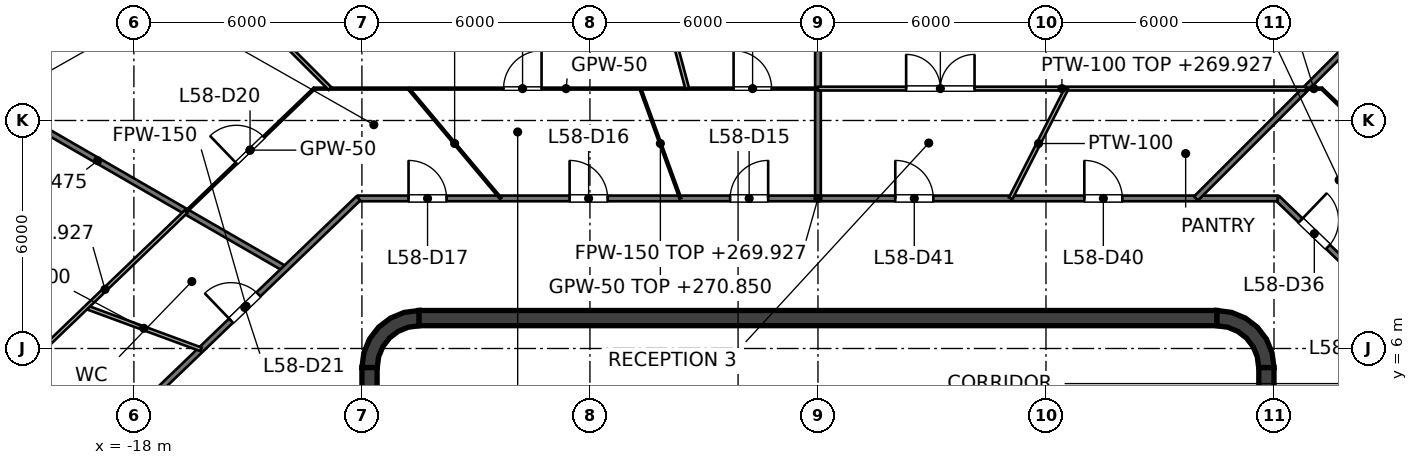
"""IFC4 building model, lengths in metres.
Left out: names, types, materials, properties, quantities, classifications, styles, units other than length and angle.
Written with IfcOpenShell. Run it as: python <this file> out.ifc"""

import sys

from ifc_helpers import new_model, si_unit, direction, frame, frame_2d, origin, place, context, subcontext, project, spatial, polyline, rectangle, outline, extrude, element, fill, save


model = new_model("IFC4")
c1 = context("Model", 3, precision=1e-05, world=origin(), true_north=direction((0.0, 1.0)))
c2 = subcontext(c1, "Body", "Model", "MODEL_VIEW")
j1 = project(units=[si_unit("LENGTHUNIT", "METRE"), si_unit("PLANEANGLEUNIT", "RADIAN")], contexts=[c1])
p1 = place(None, origin())
s1 = spatial("IfcSite", under=j1, at=p1, CompositionType="ELEMENT")
p2 = place(p1, origin())
s2 = spatial("IfcBuilding", under=s1, at=p2, CompositionType="ELEMENT")
p3 = place(p2, frame((0.0, 0.0, 267.0)))
s3 = spatial("IfcBuildingStorey", under=s2, at=p3, CompositionType="ELEMENT", Elevation=267.0)
p4 = place(p3, frame((-10.5, 6.8, 0.0), z_axis=(0.0, 0.0, 1.0), x_axis=(1.0, 0.0, 0.0)))
e1 = element("IfcWall", 1, at=p4, inside=s3, PredefinedType="SHEAR", context=c2, shape_type="SweptSolid", body=[
    extrude(rectangle(XDim=21.0, YDim=0.4, at=frame_2d((10.5, 0.0))), origin(), (0.0, 0.0, 1.0), 4.0),
])
p5 = place(p3, frame((11.8, -5.5, 0.0), z_axis=(0.0, 0.0, 1.0), x_axis=(0.0, 1.0, 0.0)))
e2 = element("IfcWall", 2, at=p5, inside=s3, PredefinedType="SHEAR", context=c2, shape_type="SweptSolid", body=[
    extrude(rectangle(XDim=11.0, YDim=0.4, at=frame_2d((5.5, 0.0))), origin(), (0.0, 0.0, 1.0), 4.0),
])
p6 = place(p5, frame((5.0, 0.0, 0.0)))
e3 = element("IfcOpeningElement", 3, at=p6, cuts=e2, PredefinedType="OPENING", context=c2, shape_type="SweptSolid", body=[
    extrude(rectangle(XDim=1.0, YDim=2.1, at=frame_2d((0.5, 1.05))), frame((0.0, 0.2, 0.0), z_axis=(0.0, -1.0, 0.0), x_axis=(1.0, 0.0, 0.0)), (0.0, 0.0, 1.0), 0.4),
])
p7 = place(p5, frame((0.9, 0.0, 0.0)))
e4 = element("IfcOpeningElement", 4, at=p7, cuts=e2, PredefinedType="OPENING", context=c2, shape_type="SweptSolid", body=[
    extrude(rectangle(XDim=1.2, YDim=2.1, at=frame_2d((0.6, 1.05))), frame((0.0, 0.2, 0.0), z_axis=(0.0, -1.0, 0.0), x_axis=(1.0, 0.0, 0.0)), (0.0, 0.0, 1.0), 0.4),
])
p8 = place(p5, frame((8.9, 0.0, 0.0)))
e5 = element("IfcOpeningElement", 5, at=p8, cuts=e2, PredefinedType="OPENING", context=c2, shape_type="SweptSolid", body=[
    extrude(rectangle(XDim=1.2, YDim=2.1, at=frame_2d((0.6, 1.05))), frame((0.0, 0.2, 0.0), z_axis=(0.0, -1.0, 0.0), x_axis=(1.0, 0.0, 0.0)), (0.0, 0.0, 1.0), 0.4),
])
p9 = place(p3, frame((-11.8, -5.5, 0.0), z_axis=(0.0, 0.0, 1.0), x_axis=(0.0, 1.0, 0.0)))
e6 = element("IfcWall", 6, at=p9, inside=s3, PredefinedType="SHEAR", context=c2, shape_type="SweptSolid", body=[
    extrude(rectangle(XDim=11.0, YDim=0.4, at=frame_2d((5.5, 0.0))), origin(), (0.0, 0.0, 1.0), 4.0),
])
p10 = place(p9, frame((5.0, 0.0, 0.0)))
e7 = element("IfcOpeningElement", 7, at=p10, cuts=e6, PredefinedType="OPENING", context=c2, shape_type="SweptSolid", body=[
    extrude(rectangle(XDim=1.0, YDim=2.1, at=frame_2d((0.5, 1.05))), frame((0.0, 0.2, 0.0), z_axis=(0.0, -1.0, 0.0), x_axis=(1.0, 0.0, 0.0)), (0.0, 0.0, 1.0), 0.4),
])
p11 = place(p9, frame((0.9, 0.0, 0.0)))
e8 = element("IfcOpeningElement", 8, at=p11, cuts=e6, PredefinedType="OPENING", context=c2, shape_type="SweptSolid", body=[
    extrude(rectangle(XDim=1.2, YDim=2.1, at=frame_2d((0.6, 1.05))), frame((0.0, 0.2, 0.0), z_axis=(0.0, -1.0, 0.0), x_axis=(1.0, 0.0, 0.0)), (0.0, 0.0, 1.0), 0.4),
])
p12 = place(p9, frame((8.9, 0.0, 0.0)))
e9 = element("IfcOpeningElement", 9, at=p12, cuts=e6, PredefinedType="OPENING", context=c2, shape_type="SweptSolid", body=[
    extrude(rectangle(XDim=1.2, YDim=2.1, at=frame_2d((0.6, 1.05))), frame((0.0, 0.2, 0.0), z_axis=(0.0, -1.0, 0.0), x_axis=(1.0, 0.0, 0.0)), (0.0, 0.0, 1.0), 0.4),
])
p13 = place(p3, origin())
e10 = element("IfcWall", 10, at=p13, inside=s3, PredefinedType="SHEAR", context=c2, shape_type="SweptSolid", body=[
    extrude(outline(polyline([(10.5, 7.0), (10.5, 6.596), (10.784, 6.559), (11.048, 6.45), (11.275, 6.275), (11.45, 6.048), (11.559, 5.784), (11.596, 5.5), (12.0, 5.5), (11.949, 5.888), (11.799, 6.25), (11.561, 6.561), (11.25, 6.799), (10.888, 6.949), (10.5, 7.0)])), origin(), (0.0, 0.0, 1.0), 4.0),
])
e11 = element("IfcWall", 11, at=p13, inside=s3, PredefinedType="SHEAR", context=c2, shape_type="SweptSolid", body=[
    extrude(outline(polyline([(-12.0, 5.5), (-11.596, 5.5), (-11.559, 5.784), (-11.45, 6.048), (-11.275, 6.275), (-11.048, 6.45), (-10.784, 6.559), (-10.5, 6.596), (-10.5, 7.0), (-10.888, 6.949), (-11.25, 6.799), (-11.561, 6.561), (-11.799, 6.25), (-11.949, 5.888), (-12.0, 5.5)])), origin(), (0.0, 0.0, 1.0), 4.0),
])
p14 = place(p3, frame((-9.0, 4.1, 0.0), z_axis=(0.0, 0.0, 1.0), x_axis=(0.0, 1.0, 0.0)))
e12 = element("IfcWall", 12, at=p14, inside=s3, PredefinedType="SOLIDWALL", context=c2, shape_type="SweptSolid", body=[
    extrude(rectangle(XDim=2.5, YDim=0.25, at=frame_2d((1.25, 0.0))), origin(), (0.0, 0.0, 1.0), 3.85),
])
p15 = place(p14, frame((0.65, 0.0, 0.0)))
e13 = element("IfcOpeningElement", 13, at=p15, cuts=e12, PredefinedType="OPENING", context=c2, shape_type="SweptSolid", body=[
    extrude(rectangle(XDim=1.2, YDim=2.1, at=frame_2d((0.6, 1.05))), frame((0.0, 0.125, 0.0), z_axis=(0.0, -1.0, 0.0), x_axis=(1.0, 0.0, 0.0)), (0.0, 0.0, 1.0), 0.25),
])
p16 = place(p3, frame((9.0, 4.1, 0.0), z_axis=(0.0, 0.0, 1.0), x_axis=(0.0, 1.0, 0.0)))
e14 = element("IfcWall", 14, at=p16, inside=s3, PredefinedType="SOLIDWALL", context=c2, shape_type="SweptSolid", body=[
    extrude(rectangle(XDim=2.5, YDim=0.25, at=frame_2d((1.25, 0.0))), origin(), (0.0, 0.0, 1.0), 3.85),
])
p17 = place(p16, frame((0.65, 0.0, 0.0)))
e15 = element("IfcOpeningElement", 15, at=p17, cuts=e14, PredefinedType="OPENING", context=c2, shape_type="SweptSolid", body=[
    extrude(rectangle(XDim=1.2, YDim=2.1, at=frame_2d((0.6, 1.05))), frame((0.0, 0.125, 0.0), z_axis=(0.0, -1.0, 0.0), x_axis=(1.0, 0.0, 0.0)), (0.0, 0.0, 1.0), 0.25),
])
for number, where, z_axis, x_axis in (
    (16, (-3.15, 4.1, 0.0), (0.0, 0.0, 1.0), (0.0, 1.0, 0.0)),
    (17, (3.15, 4.1, 0.0), (0.0, 0.0, 1.0), (0.0, 1.0, 0.0)),
):
    element("IfcWall", number, at=place(p3, frame(where, z_axis=z_axis, x_axis=x_axis)), inside=s3, PredefinedType="SOLIDWALL", context=c2, shape_type="SweptSolid", body=[
        extrude(rectangle(XDim=2.5, YDim=0.25, at=frame_2d((1.25, 0.0))), origin(), (0.0, 0.0, 1.0), 3.85),
    ])
p18 = place(p3, frame((12.095, 9.949, 0.0), z_axis=(0.0, 0.0, 1.0), x_axis=(0.721290181137, -0.692633001376, 0.0)))
e18 = element("IfcWall", 18, at=p18, inside=s3, PredefinedType="PARTITIONING", context=c2, shape_type="SweptSolid", body=[
    extrude(rectangle(XDim=8.187, YDim=0.15, at=frame_2d((4.094, 0.0))), origin(), (0.0, 0.0, 1.0), 2.918),
])
p19 = place(p18, frame((3.232, 0.0, 0.0)))
e19 = element("IfcOpeningElement", 19, at=p19, cuts=e18, PredefinedType="OPENING", context=c2, shape_type="SweptSolid", body=[
    extrude(rectangle(XDim=1.0, YDim=2.1, at=frame_2d((0.5, 1.05))), frame((0.0, 0.075, 0.0), z_axis=(0.0, -1.0, 0.0), x_axis=(1.0, 0.0, 0.0)), (0.0, 0.0, 1.0), 0.15),
])
p20 = place(p18, frame((0.839, 0.0, 0.0)))
e20 = element("IfcOpeningElement", 20, at=p20, cuts=e18, PredefinedType="OPENING", context=c2, shape_type="SweptSolid", body=[
    extrude(rectangle(XDim=1.0, YDim=2.1, at=frame_2d((0.5, 1.05))), frame((0.0, 0.075, 0.0), z_axis=(0.0, -1.0, 0.0), x_axis=(1.0, 0.0, 0.0)), (0.0, 0.0, 1.0), 0.15),
])
p21 = place(p3, frame((-23.883, 13.789, 0.0), z_axis=(0.0, 0.0, 1.0), x_axis=(0.866026665955, -0.499997813851, 0.0)))
e21 = element("IfcWall", 21, at=p21, inside=s3, PredefinedType="PARTITIONING", context=c2, shape_type="SweptSolid", body=[
    extrude(rectangle(XDim=11.384, YDim=0.15, at=frame_2d((5.692, 0.0))), origin(), (0.0, 0.0, 1.0), 3.475),
])
p22 = place(p3, frame((-12.095, 9.949, 0.0), z_axis=(0.0, 0.0, 1.0), x_axis=(1.0, 0.0, 0.0)))
e22 = element("IfcWall", 22, at=p22, inside=s3, PredefinedType="PARTITIONING", context=c2, shape_type="SweptSolid", body=[
    extrude(rectangle(XDim=24.19, YDim=0.15, at=frame_2d((12.095, 0.0))), origin(), (0.0, 0.0, 1.0), 2.927),
])
p23 = place(p22, frame((9.784, 0.0, 0.0)))
e23 = element("IfcOpeningElement", 23, at=p23, cuts=e22, PredefinedType="OPENING", context=c2, shape_type="SweptSolid", body=[
    extrude(rectangle(XDim=1.0, YDim=2.1, at=frame_2d((0.5, 1.05))), frame((0.0, 0.075, 0.0), z_axis=(0.0, -1.0, 0.0), x_axis=(1.0, 0.0, 0.0)), (0.0, 0.0, 1.0), 0.15),
])
p24 = place(p22, frame((5.56, 0.0, 0.0)))
e24 = element("IfcOpeningElement", 24, at=p24, cuts=e22, PredefinedType="OPENING", context=c2, shape_type="SweptSolid", body=[
    extrude(rectangle(XDim=1.0, YDim=2.1, at=frame_2d((0.5, 1.05))), frame((0.0, 0.075, 0.0), z_axis=(0.0, -1.0, 0.0), x_axis=(1.0, 0.0, 0.0)), (0.0, 0.0, 1.0), 0.15),
])
p25 = place(p22, frame((1.322, 0.0, 0.0)))
e25 = element("IfcOpeningElement", 25, at=p25, cuts=e22, PredefinedType="OPENING", context=c2, shape_type="SweptSolid", body=[
    extrude(rectangle(XDim=1.0, YDim=2.1, at=frame_2d((0.5, 1.05))), frame((0.0, 0.075, 0.0), z_axis=(0.0, -1.0, 0.0), x_axis=(1.0, 0.0, 0.0)), (0.0, 0.0, 1.0), 0.15),
])
p26 = place(p22, frame((19.104, 0.0, 0.0)))
e26 = element("IfcOpeningElement", 26, at=p26, cuts=e22, PredefinedType="OPENING", context=c2, shape_type="SweptSolid", body=[
    extrude(rectangle(XDim=1.0, YDim=2.1, at=frame_2d((0.5, 1.05))), frame((0.0, 0.075, 0.0), z_axis=(0.0, -1.0, 0.0), x_axis=(1.0, 0.0, 0.0)), (0.0, 0.0, 1.0), 0.15),
])
p27 = place(p22, frame((14.129, 0.0, 0.0)))
e27 = element("IfcOpeningElement", 27, at=p27, cuts=e22, PredefinedType="OPENING", context=c2, shape_type="SweptSolid", body=[
    extrude(rectangle(XDim=1.0, YDim=2.1, at=frame_2d((0.5, 1.05))), frame((0.0, 0.075, 0.0), z_axis=(0.0, -1.0, 0.0), x_axis=(1.0, 0.0, 0.0)), (0.0, 0.0, 1.0), 0.15),
])
p28 = place(p3, frame((-18.0, 4.278, 0.0), z_axis=(0.0, 0.0, 1.0), x_axis=(0.721260976692, 0.69266341285, 0.0)))
e28 = element("IfcWall", 28, at=p28, inside=s3, PredefinedType="PARTITIONING", context=c2, shape_type="SweptSolid", body=[
    extrude(rectangle(XDim=8.187, YDim=0.15, at=frame_2d((4.094, 0.0))), origin(), (0.0, 0.0, 1.0), 2.918),
])
p29 = place(p28, frame((3.544, 0.0, 0.0)))
e29 = element("IfcOpeningElement", 29, at=p29, cuts=e28, PredefinedType="OPENING", context=c2, shape_type="SweptSolid", body=[
    extrude(rectangle(XDim=1.0, YDim=2.1, at=frame_2d((0.5, 1.05))), frame((0.0, 0.075, 0.0), z_axis=(0.0, -1.0, 0.0), x_axis=(1.0, 0.0, 0.0)), (0.0, 0.0, 1.0), 0.15),
])
p30 = place(p3, frame((9.949, 9.949, 0.0), z_axis=(0.0, 0.0, 1.0), x_axis=(0.707106781187, 0.707106781187, 0.0)))
e30 = element("IfcWall", 30, at=p30, inside=s3, PredefinedType="PARTITIONING", context=c2, shape_type="SweptSolid", body=[
    extrude(rectangle(XDim=11.612, YDim=0.15, at=frame_2d((5.806, 0.0))), origin(), (0.0, 0.0, 1.0), 3.424),
])
p31 = place(p3, frame((0.0, 9.949, 0.0), z_axis=(0.0, 0.0, 1.0), x_axis=(0.0, 1.0, 0.0)))
e31 = element("IfcWall", 31, at=p31, inside=s3, PredefinedType="PARTITIONING", context=c2, shape_type="SweptSolid", body=[
    extrude(rectangle(XDim=12.881, YDim=0.15, at=frame_2d((6.44, 0.0))), origin(), (0.0, 0.0, 1.0), 2.995),
])
p32 = place(p3, frame((-4.673, 12.839, 0.0), z_axis=(0.0, 0.0, 1.0), x_axis=(0.342042598731, -0.939684447383, 0.0)))
e32 = element("IfcWall", 32, at=p32, inside=s3, PredefinedType="PARTITIONING", context=c2, shape_type="SweptSolid", body=[
    extrude(rectangle(XDim=3.076, YDim=0.05, at=frame_2d((1.538, 0.0))), origin(), (0.0, 0.0, 1.0), 3.85),
])
p33 = place(p3, frame((-10.773, 12.839, 0.0), z_axis=(0.0, 0.0, 1.0), x_axis=(0.642777681898, -0.766052773413, 0.0)))
e33 = element("IfcWall", 33, at=p33, inside=s3, PredefinedType="PARTITIONING", context=c2, shape_type="SweptSolid", body=[
    extrude(rectangle(XDim=3.773, YDim=0.05, at=frame_2d((1.886, 0.0))), origin(), (0.0, 0.0, 1.0), 3.85),
])
p34 = place(p3, frame((13.258, 12.839, 0.0), z_axis=(0.0, 0.0, 1.0), x_axis=(0.721469843217, -0.692445857327, 0.0)))
e34 = element("IfcWall", 34, at=p34, inside=s3, PredefinedType="PARTITIONING", context=c2, shape_type="SweptSolid", body=[
    extrude(rectangle(XDim=10.582, YDim=0.05, at=frame_2d((5.291, 0.0))), origin(), (0.0, 0.0, 1.0), 2.927),
])
p35 = place(p34, frame((7.072, 0.0, 0.0)))
e35 = element("IfcOpeningElement", 35, at=p35, cuts=e34, PredefinedType="OPENING", context=c2, shape_type="SweptSolid", body=[
    extrude(rectangle(XDim=1.0, YDim=2.1, at=frame_2d((0.5, 1.05))), frame((0.0, 0.025, 0.0), z_axis=(0.0, -1.0, 0.0), x_axis=(1.0, 0.0, 0.0)), (0.0, 0.0, 1.0), 0.05),
])
p36 = place(p34, frame((1.83, 0.0, 0.0)))
e36 = element("IfcOpeningElement", 36, at=p36, cuts=e34, PredefinedType="OPENING", context=c2, shape_type="SweptSolid", body=[
    extrude(rectangle(XDim=1.0, YDim=2.1, at=frame_2d((0.5, 1.05))), frame((0.0, 0.025, 0.0), z_axis=(0.0, -1.0, 0.0), x_axis=(1.0, 0.0, 0.0)), (0.0, 0.0, 1.0), 0.05),
])
p37 = place(p3, frame((-13.258, 12.839, 0.0), z_axis=(0.0, 0.0, 1.0), x_axis=(1.0, 0.0, 0.0)))
e37 = element("IfcWall", 37, at=p37, inside=s3, PredefinedType="PARTITIONING", context=c2, shape_type="SweptSolid", body=[
    extrude(rectangle(XDim=13.258, YDim=0.05, at=frame_2d((6.629, 0.0))), origin(), (0.0, 0.0, 1.0), 2.927),
])
p38 = place(p37, frame((11.038, 0.0, 0.0)))
e38 = element("IfcOpeningElement", 38, at=p38, cuts=e37, PredefinedType="OPENING", context=c2, shape_type="SweptSolid", body=[
    extrude(rectangle(XDim=1.0, YDim=2.1, at=frame_2d((0.5, 1.05))), frame((0.0, 0.025, 0.0), z_axis=(0.0, -1.0, 0.0), x_axis=(1.0, 0.0, 0.0)), (0.0, 0.0, 1.0), 0.05),
])
p39 = place(p37, frame((4.985, 0.0, 0.0)))
e39 = element("IfcOpeningElement", 39, at=p39, cuts=e37, PredefinedType="OPENING", context=c2, shape_type="SweptSolid", body=[
    extrude(rectangle(XDim=1.0, YDim=2.1, at=frame_2d((0.5, 1.05))), frame((0.0, 0.025, 0.0), z_axis=(0.0, -1.0, 0.0), x_axis=(1.0, 0.0, 0.0)), (0.0, 0.0, 1.0), 0.05),
])
p40 = place(p3, frame((12.839, 12.839, 0.0), z_axis=(0.0, 0.0, 1.0), x_axis=(1.0, 0.0, 0.0)))
e40 = element("IfcWall", 40, at=p40, inside=s3, PredefinedType="PARTITIONING", context=c2, shape_type="SweptSolid", body=[
    extrude(rectangle(XDim=0.419, YDim=0.05, at=frame_2d((0.209, 0.0))), origin(), (0.0, 0.0, 1.0), 3.85),
])
p41 = place(p3, frame((-16.629, 9.601, 0.0), z_axis=(0.0, 0.0, 1.0), x_axis=(0.721171224294, 0.692756858681, 0.0)))
e41 = element("IfcWall", 41, at=p41, inside=s3, PredefinedType="PARTITIONING", context=c2, shape_type="SweptSolid", body=[
    extrude(rectangle(XDim=4.674, YDim=0.05, at=frame_2d((2.337, 0.0))), origin(), (0.0, 0.0, 1.0), 2.927),
])
p42 = place(p41, frame((1.837, 0.0, 0.0)))
e42 = element("IfcOpeningElement", 42, at=p42, cuts=e41, PredefinedType="OPENING", context=c2, shape_type="SweptSolid", body=[
    extrude(rectangle(XDim=1.0, YDim=2.1, at=frame_2d((0.5, 1.05))), frame((0.0, 0.025, 0.0), z_axis=(0.0, -1.0, 0.0), x_axis=(1.0, 0.0, 0.0)), (0.0, 0.0, 1.0), 0.05),
])
p43 = place(p3, frame((-6.05, 22.58, 0.0), z_axis=(0.0, 0.0, 1.0), x_axis=(0.258821194786, -0.965925250281, 0.0)))
e43 = element("IfcWall", 43, at=p43, inside=s3, PredefinedType="PARTITIONING", context=c2, shape_type="SweptSolid", body=[
    extrude(rectangle(XDim=10.085, YDim=0.1, at=frame_2d((5.042, 0.0))), origin(), (0.0, 0.0, 1.0), 3.302),
])
p44 = place(p3, frame((-18.16, 18.16, 0.0), z_axis=(0.0, 0.0, 1.0), x_axis=(0.707106781187, -0.707106781187, 0.0)))
e44 = element("IfcWall", 44, at=p44, inside=s3, PredefinedType="PARTITIONING", context=c2, shape_type="SweptSolid", body=[
    extrude(rectangle(XDim=7.525, YDim=0.1, at=frame_2d((3.762, 0.0))), origin(), (0.0, 0.0, 1.0), 3.424),
])
p45 = place(p3, frame((-19.247, 7.086, 0.0), z_axis=(0.0, 0.0, 1.0), x_axis=(0.938441676653, -0.345437721625, 0.0)))
e45 = element("IfcWall", 45, at=p45, inside=s3, PredefinedType="PARTITIONING", context=c2, shape_type="SweptSolid", body=[
    extrude(rectangle(XDim=3.213, YDim=0.1, at=frame_2d((1.606, 0.0))), origin(), (0.0, 0.0, 1.0), 3.85),
])
p46 = place(p3, frame((0.0, 12.839, 0.0), z_axis=(0.0, 0.0, 1.0), x_axis=(1.0, 0.0, 0.0)))
e46 = element("IfcWall", 46, at=p46, inside=s3, PredefinedType="PARTITIONING", context=c2, shape_type="SweptSolid", body=[
    extrude(rectangle(XDim=12.839, YDim=0.1, at=frame_2d((6.419, 0.0))), origin(), (0.0, 0.0, 1.0), 2.927),
])
p47 = place(p46, frame((2.32, 0.0, 0.0)))
e47 = element("IfcOpeningElement", 47, at=p47, cuts=e46, PredefinedType="OPENING", context=c2, shape_type="SweptSolid", body=[
    extrude(rectangle(XDim=1.8, YDim=2.1, at=frame_2d((0.9, 1.05))), frame((0.0, 0.05, 0.0), z_axis=(0.0, -1.0, 0.0), x_axis=(1.0, 0.0, 0.0)), (0.0, 0.0, 1.0), 0.1),
])
p48 = place(p3, frame((-20.89, 5.509, 0.0), z_axis=(0.0, 0.0, 1.0), x_axis=(0.721200651506, 0.69272622317, 0.0)))
e48 = element("IfcWall", 48, at=p48, inside=s3, PredefinedType="PARTITIONING", context=c2, shape_type="SweptSolid", body=[
    extrude(rectangle(XDim=5.907, YDim=0.1, at=frame_2d((2.954, 0.0))), origin(), (0.0, 0.0, 1.0), 2.927),
])
p49 = place(p3, frame((5.069, 9.949, 0.0), z_axis=(0.0, 0.0, 1.0), x_axis=(0.454064453845, 0.890968838823, 0.0)))
e49 = element("IfcWall", 49, at=p49, inside=s3, PredefinedType="PARTITIONING", context=c2, shape_type="SweptSolid", body=[
    extrude(rectangle(XDim=3.244, YDim=0.1, at=frame_2d((1.622, 0.0))), origin(), (0.0, 0.0, 1.0), 3.85),
])
p50 = place(p15, origin())
e50 = element("IfcDoor", 50, at=p50, inside=s3, OperationType="SINGLE_SWING_RIGHT", PredefinedType="DOOR", context=c2, shape_type="SweptSolid", body=[
    extrude(rectangle(XDim=1.2, YDim=2.1, at=frame_2d((0.6, 1.05))), frame((0.0, 0.025, 0.0), z_axis=(0.0, -1.0, 0.0), x_axis=(1.0, 0.0, 0.0)), (0.0, 0.0, 1.0), 0.05),
])
fill(e13, e50)
p51 = place(p17, origin())
e51 = element("IfcDoor", 51, at=p51, inside=s3, OperationType="SINGLE_SWING_LEFT", PredefinedType="DOOR", context=c2, shape_type="SweptSolid", body=[
    extrude(rectangle(XDim=1.2, YDim=2.1, at=frame_2d((0.6, 1.05))), frame((0.0, 0.025, 0.0), z_axis=(0.0, -1.0, 0.0), x_axis=(1.0, 0.0, 0.0)), (0.0, 0.0, 1.0), 0.05),
])
fill(e15, e51)
p52 = place(p23, origin())
e52 = element("IfcDoor", 52, at=p52, inside=s3, OperationType="SINGLE_SWING_RIGHT", PredefinedType="DOOR", context=c2, shape_type="SweptSolid", body=[
    extrude(rectangle(XDim=1.0, YDim=2.1, at=frame_2d((0.5, 1.05))), frame((0.0, 0.025, 0.0), z_axis=(0.0, -1.0, 0.0), x_axis=(1.0, 0.0, 0.0)), (0.0, 0.0, 1.0), 0.05),
])
fill(e23, e52)
p53 = place(p24, origin())
e53 = element("IfcDoor", 53, at=p53, inside=s3, OperationType="SINGLE_SWING_LEFT", PredefinedType="DOOR", context=c2, shape_type="SweptSolid", body=[
    extrude(rectangle(XDim=1.0, YDim=2.1, at=frame_2d((0.5, 1.05))), frame((0.0, 0.025, 0.0), z_axis=(0.0, -1.0, 0.0), x_axis=(1.0, 0.0, 0.0)), (0.0, 0.0, 1.0), 0.05),
])
fill(e24, e53)
p54 = place(p25, origin())
e54 = element("IfcDoor", 54, at=p54, inside=s3, OperationType="SINGLE_SWING_LEFT", PredefinedType="DOOR", context=c2, shape_type="SweptSolid", body=[
    extrude(rectangle(XDim=1.0, YDim=2.1, at=frame_2d((0.5, 1.05))), frame((0.0, 0.025, 0.0), z_axis=(0.0, -1.0, 0.0), x_axis=(1.0, 0.0, 0.0)), (0.0, 0.0, 1.0), 0.05),
])
fill(e25, e54)
p55 = place(p38, origin())
e55 = element("IfcDoor", 55, at=p55, inside=s3, OperationType="SINGLE_SWING_LEFT", PredefinedType="DOOR", context=c2, shape_type="SweptSolid", body=[
    extrude(rectangle(XDim=1.0, YDim=2.1, at=frame_2d((0.5, 1.05))), frame((0.0, 0.025, 0.0), z_axis=(0.0, -1.0, 0.0), x_axis=(1.0, 0.0, 0.0)), (0.0, 0.0, 1.0), 0.05),
])
fill(e38, e55)
p56 = place(p39, origin())
e56 = element("IfcDoor", 56, at=p56, inside=s3, OperationType="SINGLE_SWING_RIGHT", PredefinedType="DOOR", context=c2, shape_type="SweptSolid", body=[
    extrude(rectangle(XDim=1.0, YDim=2.1, at=frame_2d((0.5, 1.05))), frame((0.0, 0.025, 0.0), z_axis=(0.0, -1.0, 0.0), x_axis=(1.0, 0.0, 0.0)), (0.0, 0.0, 1.0), 0.05),
])
fill(e39, e56)
p57 = place(p42, origin())
e57 = element("IfcDoor", 57, at=p57, inside=s3, OperationType="SINGLE_SWING_LEFT", PredefinedType="DOOR", context=c2, shape_type="SweptSolid", body=[
    extrude(rectangle(XDim=1.0, YDim=2.1, at=frame_2d((0.5, 1.05))), frame((0.0, 0.025, 0.0), z_axis=(0.0, -1.0, 0.0), x_axis=(1.0, 0.0, 0.0)), (0.0, 0.0, 1.0), 0.05),
])
fill(e42, e57)
p58 = place(p29, origin())
e58 = element("IfcDoor", 58, at=p58, inside=s3, OperationType="SINGLE_SWING_LEFT", PredefinedType="DOOR", context=c2, shape_type="SweptSolid", body=[
    extrude(rectangle(XDim=1.0, YDim=2.1, at=frame_2d((0.5, 1.05))), frame((0.0, 0.025, 0.0), z_axis=(0.0, -1.0, 0.0), x_axis=(1.0, 0.0, 0.0)), (0.0, 0.0, 1.0), 0.05),
])
fill(e29, e58)
p59 = place(p20, origin())
e59 = element("IfcDoor", 59, at=p59, inside=s3, OperationType="SINGLE_SWING_LEFT", PredefinedType="DOOR", context=c2, shape_type="SweptSolid", body=[
    extrude(rectangle(XDim=1.0, YDim=2.1, at=frame_2d((0.5, 1.05))), frame((0.0, 0.025, 0.0), z_axis=(0.0, -1.0, 0.0), x_axis=(1.0, 0.0, 0.0)), (0.0, 0.0, 1.0), 0.05),
])
fill(e20, e59)
p60 = place(p26, origin())
e60 = element("IfcDoor", 60, at=p60, inside=s3, OperationType="SINGLE_SWING_LEFT", PredefinedType="DOOR", context=c2, shape_type="SweptSolid", body=[
    extrude(rectangle(XDim=1.0, YDim=2.1, at=frame_2d((0.5, 1.05))), frame((0.0, 0.025, 0.0), z_axis=(0.0, -1.0, 0.0), x_axis=(1.0, 0.0, 0.0)), (0.0, 0.0, 1.0), 0.05),
])
fill(e26, e60)
p61 = place(p27, origin())
e61 = element("IfcDoor", 61, at=p61, inside=s3, OperationType="SINGLE_SWING_LEFT", PredefinedType="DOOR", context=c2, shape_type="SweptSolid", body=[
    extrude(rectangle(XDim=1.0, YDim=2.1, at=frame_2d((0.5, 1.05))), frame((0.0, 0.025, 0.0), z_axis=(0.0, -1.0, 0.0), x_axis=(1.0, 0.0, 0.0)), (0.0, 0.0, 1.0), 0.05),
])
fill(e27, e61)
p62 = place(p47, origin())
e62 = element("IfcDoor", 62, at=p62, inside=s3, OperationType="DOUBLE_DOOR_SINGLE_SWING", PredefinedType="DOOR", context=c2, shape_type="SweptSolid", body=[
    extrude(rectangle(XDim=1.8, YDim=2.1, at=frame_2d((0.9, 1.05))), frame((0.0, 0.025, 0.0), z_axis=(0.0, -1.0, 0.0), x_axis=(1.0, 0.0, 0.0)), (0.0, 0.0, 1.0), 0.05),
])
fill(e47, e62)
save(model, sys.argv[1])
